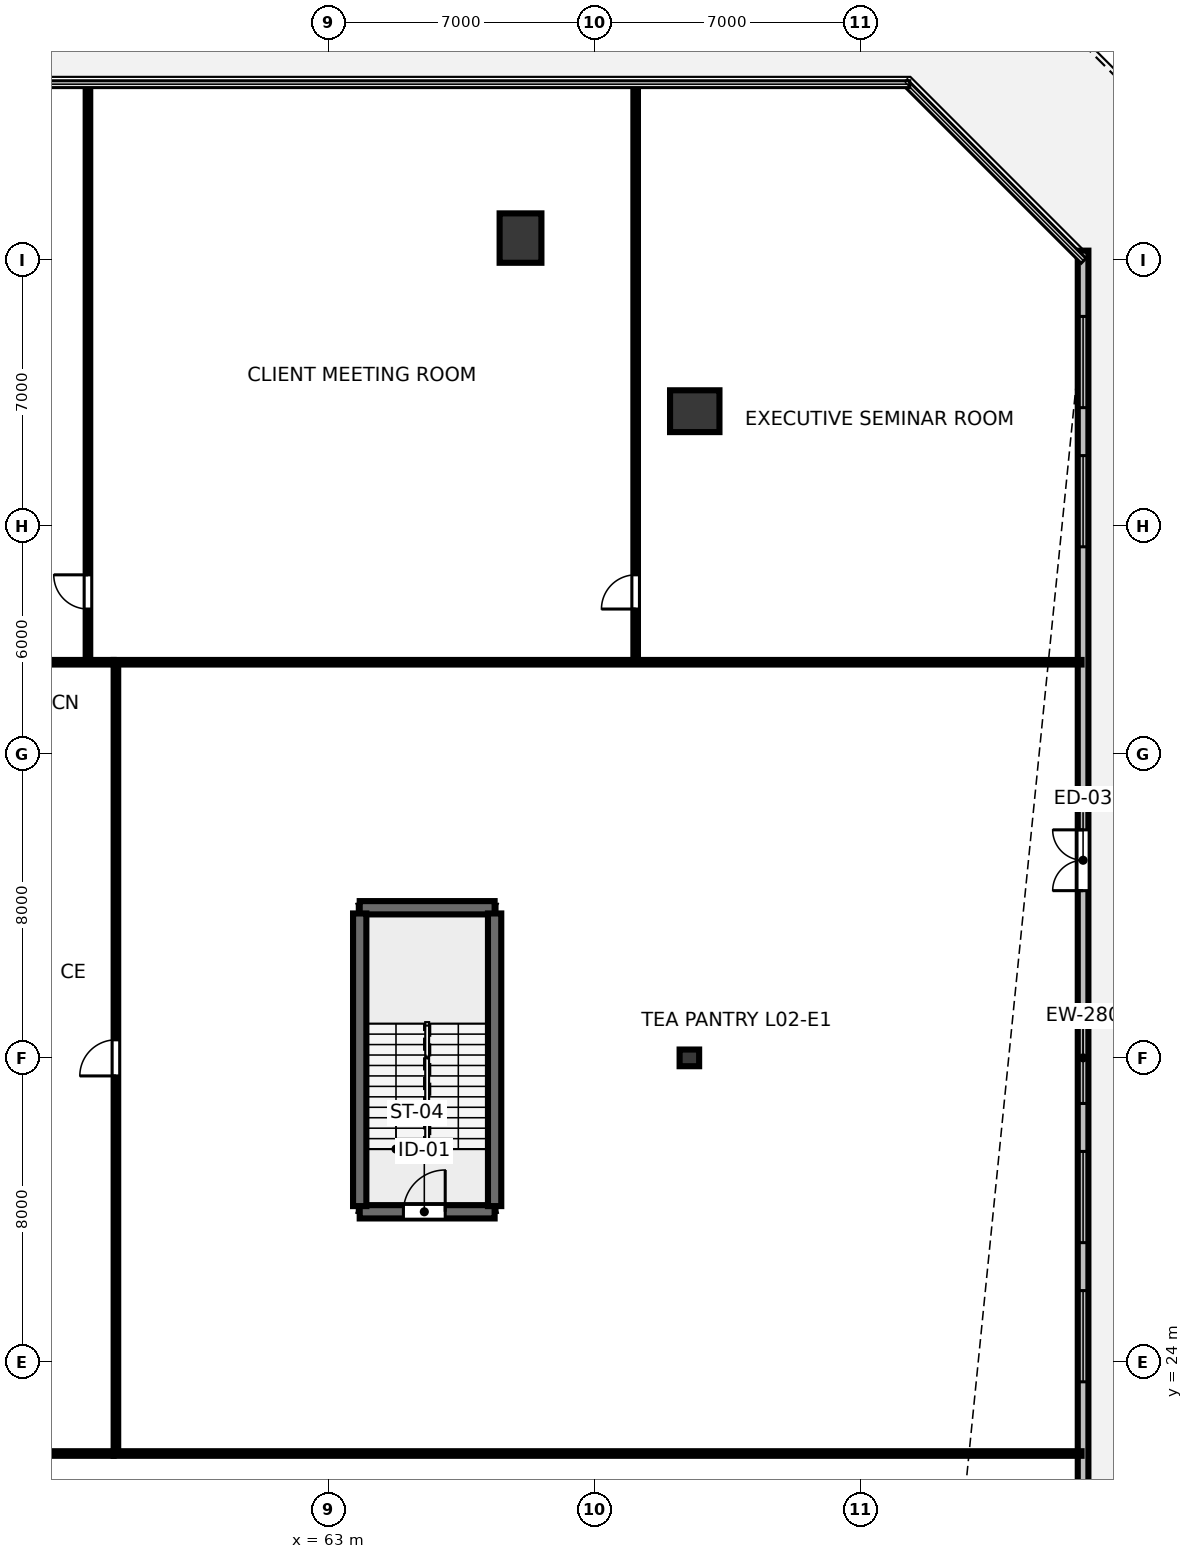
"""IFC4 building model, lengths in metres.
Left out: names, types, materials, properties, quantities, classifications, styles, units other than length and angle.
Written with IfcOpenShell. Run it as: python <this file> out.ifc"""

import sys

from ifc_helpers import new_model, si_unit, direction, frame, frame_2d, origin, origin_2d, place, context, subcontext, project, spatial, rectangle, hollow_rectangle, i_section, extrude, element, fill, save


model = new_model("IFC4")
c1 = context("Model", 3, precision=1e-05, world=origin(), true_north=direction((0.0, 1.0)))
c2 = subcontext(c1, "Body", "Model", "MODEL_VIEW")
j1 = project(units=[si_unit("LENGTHUNIT", "METRE"), si_unit("PLANEANGLEUNIT", "RADIAN")], contexts=[c1])
p1 = place(None, origin())
s1 = spatial("IfcSite", under=j1, at=p1, CompositionType="ELEMENT")
p2 = place(p1, origin())
s2 = spatial("IfcBuilding", under=s1, at=p2, CompositionType="ELEMENT")
p3 = place(p2, frame((0.0, 0.0, 9.5)))
s3 = spatial("IfcBuildingStorey", under=s2, at=p3, CompositionType="ELEMENT", Elevation=9.5)
p4 = place(p3, frame((72.5, 32.0, 0.0), z_axis=(0.0, 0.0, 1.0), x_axis=(0.0, 1.0, 0.0)))
e1 = element("IfcColumn", 1, at=p4, inside=s3, PredefinedType="COLUMN", context=c2, shape_type="SweptSolid", body=[
    extrude(i_section(OverallWidth=0.439, OverallDepth=0.514, WebThickness=0.06, FlangeThickness=0.097, FilletRadius=0.025, at=origin_2d()), origin(), (0.0, 0.0, 1.0), 4.208),
])
for number, where, z_axis, x_axis in (
    (2, (72.642, 49.016, 0.0), (0.0, 0.0, 1.0), (0.0, 1.0, 0.0)),
    (3, (68.057, 53.571, 0.0), (0.0, 0.0, 1.0), (1.0, 0.0, 0.0)),
):
    element("IfcColumn", number, at=place(p3, frame(where, z_axis=z_axis, x_axis=x_axis)), inside=s3, PredefinedType="COLUMN", context=c2, shape_type="SweptSolid", body=[
        extrude(hollow_rectangle(XDim=1.1, YDim=1.3, WallThickness=0.07, at=origin_2d()), origin(), (0.0, 0.0, 1.0), 4.208),
    ])
p5 = place(p3, frame((82.86, 10.76, 0.0), z_axis=(0.0, 0.0, 1.0), x_axis=(0.0, 1.0, 0.0)))
e4 = element("IfcWall", 4, at=p5, inside=s3, PredefinedType="STANDARD", context=c2, shape_type="SweptSolid", body=[
    extrude(rectangle(XDim=42.48, YDim=0.28, at=frame_2d((21.24, 0.0))), origin(), (0.0, 0.0, 1.0), 4.21),
])
p6 = place(p5, frame((25.64, 0.0, 0.0)))
e5 = element("IfcOpeningElement", 5, at=p6, cuts=e4, PredefinedType="OPENING", context=c2, shape_type="SweptSolid", body=[
    extrude(rectangle(XDim=1.6, YDim=2.15, at=frame_2d((0.8, 1.075))), frame((0.0, 0.15, 0.0), z_axis=(0.0, -1.0, 0.0), x_axis=(1.0, 0.0, 0.0)), (0.0, 0.0, 1.0), 0.3),
])
p7 = place(p5, frame((1.731, 0.0, 0.85)))
e6 = element("IfcOpeningElement", 6, at=p7, cuts=e4, PredefinedType="OPENING", context=c2, shape_type="SweptSolid", body=[
    extrude(rectangle(XDim=2.4, YDim=2.4, at=frame_2d((1.2, 1.2))), frame((0.0, 0.15, 0.0), z_axis=(0.0, -1.0, 0.0), x_axis=(1.0, 0.0, 0.0)), (0.0, 0.0, 1.0), 0.3),
])
p8 = place(p5, frame((5.393, 0.0, 0.85)))
e7 = element("IfcOpeningElement", 7, at=p8, cuts=e4, PredefinedType="OPENING", context=c2, shape_type="SweptSolid", body=[
    extrude(rectangle(XDim=2.4, YDim=2.4, at=frame_2d((1.2, 1.2))), frame((0.0, 0.15, 0.0), z_axis=(0.0, -1.0, 0.0), x_axis=(1.0, 0.0, 0.0)), (0.0, 0.0, 1.0), 0.3),
])
p9 = place(p5, frame((12.716, 0.0, 0.85)))
e8 = element("IfcOpeningElement", 8, at=p9, cuts=e4, PredefinedType="OPENING", context=c2, shape_type="SweptSolid", body=[
    extrude(rectangle(XDim=2.4, YDim=2.4, at=frame_2d((1.2, 1.2))), frame((0.0, 0.15, 0.0), z_axis=(0.0, -1.0, 0.0), x_axis=(1.0, 0.0, 0.0)), (0.0, 0.0, 1.0), 0.3),
])
p10 = place(p5, frame((16.378, 0.0, 0.85)))
e9 = element("IfcOpeningElement", 9, at=p10, cuts=e4, PredefinedType="OPENING", context=c2, shape_type="SweptSolid", body=[
    extrude(rectangle(XDim=2.4, YDim=2.4, at=frame_2d((1.2, 1.2))), frame((0.0, 0.15, 0.0), z_axis=(0.0, -1.0, 0.0), x_axis=(1.0, 0.0, 0.0)), (0.0, 0.0, 1.0), 0.3),
])
p11 = place(p5, frame((20.04, 0.0, 0.85)))
e10 = element("IfcOpeningElement", 10, at=p11, cuts=e4, PredefinedType="OPENING", context=c2, shape_type="SweptSolid", body=[
    extrude(rectangle(XDim=2.4, YDim=2.4, at=frame_2d((1.2, 1.2))), frame((0.0, 0.15, 0.0), z_axis=(0.0, -1.0, 0.0), x_axis=(1.0, 0.0, 0.0)), (0.0, 0.0, 1.0), 0.3),
])
p12 = place(p5, frame((34.687, 0.0, 0.85)))
e11 = element("IfcOpeningElement", 11, at=p12, cuts=e4, PredefinedType="OPENING", context=c2, shape_type="SweptSolid", body=[
    extrude(rectangle(XDim=2.4, YDim=2.4, at=frame_2d((1.2, 1.2))), frame((0.0, 0.15, 0.0), z_axis=(0.0, -1.0, 0.0), x_axis=(1.0, 0.0, 0.0)), (0.0, 0.0, 1.0), 0.3),
])
p13 = place(p5, frame((38.349, 0.0, 0.85)))
e12 = element("IfcOpeningElement", 12, at=p13, cuts=e4, PredefinedType="OPENING", context=c2, shape_type="SweptSolid", body=[
    extrude(rectangle(XDim=2.4, YDim=2.4, at=frame_2d((1.2, 1.2))), frame((0.0, 0.15, 0.0), z_axis=(0.0, -1.0, 0.0), x_axis=(1.0, 0.0, 0.0)), (0.0, 0.0, 1.0), 0.3),
])
p14 = place(p3, frame((34.65, 21.59, 0.0), z_axis=(0.0, 0.0, 1.0), x_axis=(1.0, 0.0, 0.0)))
e13 = element("IfcWall", 13, at=p14, inside=s3, PredefinedType="PARTITIONING", context=c2, shape_type="SweptSolid", body=[
    extrude(rectangle(XDim=22.7, YDim=0.12, at=frame_2d((11.35, 0.0))), origin(), (0.0, 0.0, 1.0), 3.31),
])
p15 = place(p14, frame((1.344, 0.0, 0.0)))
e14 = element("IfcOpeningElement", 14, at=p15, cuts=e13, PredefinedType="OPENING", context=c2, shape_type="SweptSolid", body=[
    extrude(rectangle(XDim=0.95, YDim=2.15, at=frame_2d((0.475, 1.075))), frame((0.0, 0.07, 0.0), z_axis=(0.0, -1.0, 0.0), x_axis=(1.0, 0.0, 0.0)), (0.0, 0.0, 1.0), 0.14),
])
p16 = place(p14, frame((12.554, 0.0, 0.0)))
e15 = element("IfcOpeningElement", 15, at=p16, cuts=e13, PredefinedType="OPENING", context=c2, shape_type="SweptSolid", body=[
    extrude(rectangle(XDim=0.95, YDim=2.15, at=frame_2d((0.475, 1.075))), frame((0.0, 0.07, 0.0), z_axis=(0.0, -1.0, 0.0), x_axis=(1.0, 0.0, 0.0)), (0.0, 0.0, 1.0), 0.14),
])
p17 = place(p3, frame((56.674, 42.41, 0.0), z_axis=(0.0, 0.0, 1.0), x_axis=(0.0, 1.0, 0.0)))
e16 = element("IfcWall", 16, at=p17, inside=s3, PredefinedType="PARTITIONING", context=c2, shape_type="SweptSolid", body=[
    extrude(rectangle(XDim=15.21, YDim=0.12, at=frame_2d((7.605, 0.0))), origin(), (0.0, 0.0, 1.0), 3.31),
])
p18 = place(p17, frame((1.4, 0.0, 0.0)))
e17 = element("IfcOpeningElement", 17, at=p18, cuts=e16, PredefinedType="OPENING", context=c2, shape_type="SweptSolid", body=[
    extrude(rectangle(XDim=0.9, YDim=2.15, at=frame_2d((0.45, 1.075))), frame((0.0, 0.07, 0.0), z_axis=(0.0, -1.0, 0.0), x_axis=(1.0, 0.0, 0.0)), (0.0, 0.0, 1.0), 0.14),
])
p19 = place(p3, frame((71.087, 42.41, 0.0), z_axis=(0.0, 0.0, 1.0), x_axis=(0.0, 1.0, 0.0)))
e18 = element("IfcWall", 18, at=p19, inside=s3, PredefinedType="PARTITIONING", context=c2, shape_type="SweptSolid", body=[
    extrude(rectangle(XDim=15.21, YDim=0.12, at=frame_2d((7.605, 0.0))), origin(), (0.0, 0.0, 1.0), 3.31),
])
p20 = place(p19, frame((1.4, 0.0, 0.0)))
e19 = element("IfcOpeningElement", 19, at=p20, cuts=e18, PredefinedType="OPENING", context=c2, shape_type="SweptSolid", body=[
    extrude(rectangle(XDim=0.9, YDim=2.15, at=frame_2d((0.45, 1.075))), frame((0.0, 0.07, 0.0), z_axis=(0.0, -1.0, 0.0), x_axis=(1.0, 0.0, 0.0)), (0.0, 0.0, 1.0), 0.14),
])
p21 = place(p3, frame((34.65, 42.41, 0.0), z_axis=(0.0, 0.0, 1.0), x_axis=(1.0, 0.0, 0.0)))
e20 = element("IfcWall", 20, at=p21, inside=s3, PredefinedType="PARTITIONING", context=c2, shape_type="SweptSolid", body=[
    extrude(rectangle(XDim=22.7, YDim=0.12, at=frame_2d((11.35, 0.0))), origin(), (0.0, 0.0, 1.0), 3.31),
])
p22 = place(p21, frame((10.607, 0.0, 0.0)))
e21 = element("IfcOpeningElement", 21, at=p22, cuts=e20, PredefinedType="OPENING", context=c2, shape_type="SweptSolid", body=[
    extrude(rectangle(XDim=0.95, YDim=2.15, at=frame_2d((0.475, 1.075))), frame((0.0, 0.07, 0.0), z_axis=(0.0, -1.0, 0.0), x_axis=(1.0, 0.0, 0.0)), (0.0, 0.0, 1.0), 0.14),
])
p23 = place(p3, frame((57.41, 21.65, 0.0), z_axis=(0.0, 0.0, 1.0), x_axis=(0.0, 1.0, 0.0)))
e22 = element("IfcWall", 22, at=p23, inside=s3, PredefinedType="PARTITIONING", context=c2, shape_type="SweptSolid", body=[
    extrude(rectangle(XDim=20.7, YDim=0.12, at=frame_2d((10.35, 0.0))), origin(), (0.0, 0.0, 1.0), 3.31),
])
p24 = place(p23, frame((9.875, 0.0, 0.0)))
e23 = element("IfcOpeningElement", 23, at=p24, cuts=e22, PredefinedType="OPENING", context=c2, shape_type="SweptSolid", body=[
    extrude(rectangle(XDim=0.95, YDim=2.15, at=frame_2d((0.475, 1.075))), frame((0.0, 0.07, 0.0), z_axis=(0.0, -1.0, 0.0), x_axis=(1.0, 0.0, 0.0)), (0.0, 0.0, 1.0), 0.14),
])
for number, where, z_axis, x_axis in (
    (24, (57.35, 21.59, 0.0), (0.0, 0.0, 1.0), (1.0, 0.0, 0.0)),
    (25, (57.35, 42.41, 0.0), (0.0, 0.0, 1.0), (1.0, 0.0, 0.0)),
):
    element("IfcWall", number, at=place(p3, frame(where, z_axis=z_axis, x_axis=x_axis)), inside=s3, PredefinedType="PARTITIONING", context=c2, shape_type="SweptSolid", body=[
        extrude(rectangle(XDim=25.47, YDim=0.12, at=frame_2d((12.735, 0.0))), origin(), (0.0, 0.0, 1.0), 3.31),
    ])
p25 = place(p3, frame((63.825, 27.95, 0.0), z_axis=(0.0, 0.0, 1.0), x_axis=(1.0, 0.0, 0.0)))
e26 = element("IfcWall", 26, at=p25, inside=s3, PredefinedType="SHEAR", context=c2, shape_type="SweptSolid", body=[
    extrude(rectangle(XDim=3.55, YDim=0.35, at=frame_2d((1.775, 0.0))), origin(), (0.0, 0.0, 1.0), 4.5),
])
p26 = place(p25, frame((1.15, 0.0, 0.0)))
e27 = element("IfcOpeningElement", 27, at=p26, cuts=e26, PredefinedType="OPENING", context=c2, shape_type="SweptSolid", body=[
    extrude(rectangle(XDim=1.1, YDim=2.15, at=frame_2d((0.55, 1.075))), frame((0.0, 0.185, 0.0), z_axis=(0.0, -1.0, 0.0), x_axis=(1.0, 0.0, 0.0)), (0.0, 0.0, 1.0), 0.37),
])
p27 = place(p3, frame((63.825, 35.95, 0.0), z_axis=(0.0, 0.0, 1.0), x_axis=(1.0, 0.0, 0.0)))
e28 = element("IfcWall", 28, at=p27, inside=s3, PredefinedType="SHEAR", context=c2, shape_type="SweptSolid", body=[
    extrude(rectangle(XDim=3.55, YDim=0.35, at=frame_2d((1.775, 0.0))), origin(), (0.0, 0.0, 1.0), 4.5),
])
for number, where, z_axis, x_axis in (
    (29, (63.825, 28.1, 0.0), (0.0, 0.0, 1.0), (0.0, 1.0, 0.0)),
    (30, (67.375, 28.1, 0.0), (0.0, 0.0, 1.0), (0.0, 1.0, 0.0)),
):
    element("IfcWall", number, at=place(p3, frame(where, z_axis=z_axis, x_axis=x_axis)), inside=s3, PredefinedType="SHEAR", context=c2, shape_type="SweptSolid", body=[
        extrude(rectangle(XDim=7.7, YDim=0.35, at=frame_2d((3.85, 0.0))), origin(), (0.0, 0.0, 1.0), 4.5),
    ])
p28 = place(p6, origin())
e31 = element("IfcDoor", 31, at=p28, inside=s3, OperationType="DOUBLE_DOOR_SINGLE_SWING", PredefinedType="DOOR", context=c2, shape_type="SweptSolid", body=[
    extrude(rectangle(XDim=1.6, YDim=2.15, at=frame_2d((0.8, 1.075))), frame((0.0, 0.025, 0.0), z_axis=(0.0, -1.0, 0.0), x_axis=(1.0, 0.0, 0.0)), (0.0, 0.0, 1.0), 0.05),
])
fill(e5, e31)
p29 = place(p9, origin())
e32 = element("IfcWindow", 32, at=p29, inside=s3, PartitioningType="SINGLE_PANEL", PredefinedType="WINDOW", context=c2, shape_type="SweptSolid", body=[
    extrude(rectangle(XDim=2.4, YDim=2.4, at=frame_2d((1.2, 1.2))), frame((0.0, 0.03, 0.0), z_axis=(0.0, -1.0, 0.0), x_axis=(1.0, 0.0, 0.0)), (0.0, 0.0, 1.0), 0.06),
])
fill(e8, e32)
p30 = place(p10, origin())
e33 = element("IfcWindow", 33, at=p30, inside=s3, PartitioningType="SINGLE_PANEL", PredefinedType="WINDOW", context=c2, shape_type="SweptSolid", body=[
    extrude(rectangle(XDim=2.4, YDim=2.4, at=frame_2d((1.2, 1.2))), frame((0.0, 0.03, 0.0), z_axis=(0.0, -1.0, 0.0), x_axis=(1.0, 0.0, 0.0)), (0.0, 0.0, 1.0), 0.06),
])
fill(e9, e33)
p31 = place(p11, origin())
e34 = element("IfcWindow", 34, at=p31, inside=s3, PartitioningType="SINGLE_PANEL", PredefinedType="WINDOW", context=c2, shape_type="SweptSolid", body=[
    extrude(rectangle(XDim=2.4, YDim=2.4, at=frame_2d((1.2, 1.2))), frame((0.0, 0.03, 0.0), z_axis=(0.0, -1.0, 0.0), x_axis=(1.0, 0.0, 0.0)), (0.0, 0.0, 1.0), 0.06),
])
fill(e10, e34)
p32 = place(p12, origin())
e35 = element("IfcWindow", 35, at=p32, inside=s3, PartitioningType="SINGLE_PANEL", PredefinedType="WINDOW", context=c2, shape_type="SweptSolid", body=[
    extrude(rectangle(XDim=2.4, YDim=2.4, at=frame_2d((1.2, 1.2))), frame((0.0, 0.03, 0.0), z_axis=(0.0, -1.0, 0.0), x_axis=(1.0, 0.0, 0.0)), (0.0, 0.0, 1.0), 0.06),
])
fill(e11, e35)
p33 = place(p13, origin())
e36 = element("IfcWindow", 36, at=p33, inside=s3, PartitioningType="SINGLE_PANEL", PredefinedType="WINDOW", context=c2, shape_type="SweptSolid", body=[
    extrude(rectangle(XDim=2.4, YDim=2.4, at=frame_2d((1.2, 1.2))), frame((0.0, 0.03, 0.0), z_axis=(0.0, -1.0, 0.0), x_axis=(1.0, 0.0, 0.0)), (0.0, 0.0, 1.0), 0.06),
])
fill(e12, e36)
p34 = place(p18, origin())
e37 = element("IfcDoor", 37, at=p34, inside=s3, OperationType="SINGLE_SWING_RIGHT", PredefinedType="DOOR", context=c2, shape_type="SweptSolid", body=[
    extrude(rectangle(XDim=0.9, YDim=2.15, at=frame_2d((0.45, 1.075))), frame((0.0, 0.025, 0.0), z_axis=(0.0, -1.0, 0.0), x_axis=(1.0, 0.0, 0.0)), (0.0, 0.0, 1.0), 0.05),
])
fill(e17, e37)
p35 = place(p20, origin())
e38 = element("IfcDoor", 38, at=p35, inside=s3, OperationType="SINGLE_SWING_LEFT", PredefinedType="DOOR", context=c2, shape_type="SweptSolid", body=[
    extrude(rectangle(XDim=0.9, YDim=2.15, at=frame_2d((0.45, 1.075))), frame((0.0, 0.025, 0.0), z_axis=(0.0, -1.0, 0.0), x_axis=(1.0, 0.0, 0.0)), (0.0, 0.0, 1.0), 0.05),
])
fill(e19, e38)
p36 = place(p24, origin())
e39 = element("IfcDoor", 39, at=p36, inside=s3, OperationType="SINGLE_SWING_LEFT", PredefinedType="DOOR", context=c2, shape_type="SweptSolid", body=[
    extrude(rectangle(XDim=0.95, YDim=2.15, at=frame_2d((0.475, 1.075))), frame((0.0, 0.025, 0.0), z_axis=(0.0, -1.0, 0.0), x_axis=(1.0, 0.0, 0.0)), (0.0, 0.0, 1.0), 0.05),
])
fill(e23, e39)
p37 = place(p26, origin())
e40 = element("IfcDoor", 40, at=p37, inside=s3, OperationType="SINGLE_SWING_RIGHT", PredefinedType="DOOR", context=c2, shape_type="SweptSolid", body=[
    extrude(rectangle(XDim=1.1, YDim=2.15, at=frame_2d((0.55, 1.075))), frame((0.0, 0.025, 0.0), z_axis=(0.0, -1.0, 0.0), x_axis=(1.0, 0.0, 0.0)), (0.0, 0.0, 1.0), 0.05),
])
fill(e27, e40)
save(model, sys.argv[1])
